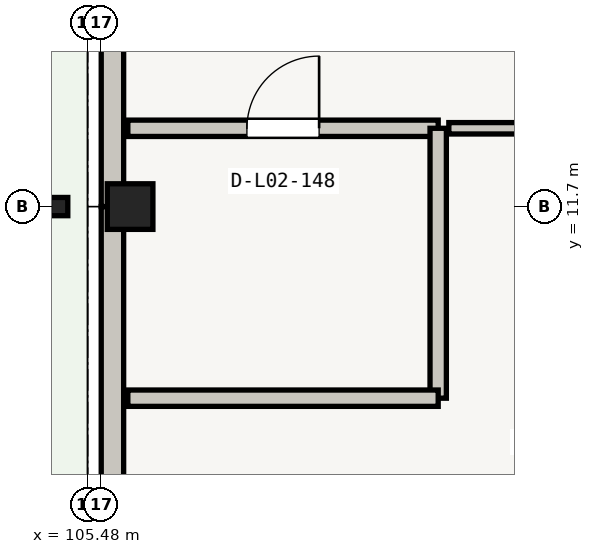
"""IFC4 building model, lengths in metres.
Left out: names, types, materials, properties, quantities, classifications, styles, units other than length and angle.
Written with IfcOpenShell. Run it as: python <this file> out.ifc"""

import sys

from ifc_helpers import new_model, si_unit, direction, frame, frame_2d, origin, origin_2d, place, context, subcontext, project, spatial, rectangle, i_section, extrude, element, fill, save


model = new_model("IFC4")
c1 = context("Model", 3, precision=1e-05, world=origin(), true_north=direction((0.0, 1.0)))
c2 = subcontext(c1, "Body", "Model", "MODEL_VIEW")
j1 = project(units=[si_unit("LENGTHUNIT", "METRE"), si_unit("PLANEANGLEUNIT", "RADIAN")], contexts=[c1])
p1 = place(None, origin())
s1 = spatial("IfcSite", under=j1, at=p1, CompositionType="ELEMENT")
p2 = place(p1, origin())
s2 = spatial("IfcBuilding", under=s1, at=p2, CompositionType="ELEMENT")
p3 = place(p2, frame((0.0, 0.0, 8.7)))
s3 = spatial("IfcBuildingStorey", under=s2, at=p3, CompositionType="ELEMENT", Elevation=8.7)
p4 = place(p3, frame((106.04, 11.7, 0.0), z_axis=(0.0, 0.0, 1.0), x_axis=(1.0, 0.0, 0.0)))
e1 = element("IfcColumn", 1, at=p4, inside=s3, PredefinedType="COLUMN", context=c2, shape_type="SweptSolid", body=[
    extrude(rectangle(XDim=0.6, YDim=0.6, at=origin_2d()), origin(), (0.0, 0.0, 1.0), 4.02),
])
p5 = place(p3, frame((105.1, 11.7, -0.24), z_axis=(0.0, 0.0, 1.0), x_axis=(1.0, 0.0, 0.0)))
e2 = element("IfcColumn", 2, at=p5, inside=s3, PredefinedType="COLUMN", context=c2, shape_type="SweptSolid", body=[
    extrude(i_section(OverallWidth=0.24, OverallDepth=0.24, WebThickness=0.01, FlangeThickness=0.017, FilletRadius=0.021, at=origin_2d()), origin(), (0.0, 0.0, 1.0), 1.12),
])
for number, where, z_axis, x_axis in (
    (3, (105.808, 4.795, 0.0), (0.0, 0.0, 1.0), (0.0, 1.0, 0.0)),
    (4, (105.808, 11.7, 0.0), (0.0, 0.0, 1.0), (0.0, 1.0, 0.0)),
):
    element("IfcWall", number, at=place(p3, frame(where, z_axis=z_axis, x_axis=x_axis)), inside=s3, PredefinedType="STANDARD", context=c2, shape_type="SweptSolid", body=[
        extrude(rectangle(XDim=6.905, YDim=0.295, at=frame_2d((3.453, 0.0))), origin(), (0.0, 0.0, 1.0), 3.632),
    ])
p6 = place(p3, frame((106.01, 12.73, 0.0), z_axis=(0.0, 0.0, 1.0), x_axis=(1.0, 0.0, 0.0)))
e5 = element("IfcWall", 5, at=p6, inside=s3, PredefinedType="PLUMBINGWALL", context=c2, shape_type="SweptSolid", body=[
    extrude(rectangle(XDim=4.083, YDim=0.215, at=frame_2d((2.042, 0.0))), origin(), (0.0, 0.0, 1.0), 2.925),
])
p7 = place(p6, frame((1.567, 0.0, 0.0)))
e6 = element("IfcOpeningElement", 6, at=p7, cuts=e5, PredefinedType="OPENING", context=c2, shape_type="SweptSolid", body=[
    extrude(rectangle(XDim=0.95, YDim=2.05, at=frame_2d((0.475, 1.025))), frame((0.0, 0.107, 0.0), z_axis=(0.0, -1.0, 0.0), x_axis=(1.0, 0.0, 0.0)), (0.0, 0.0, 1.0), 0.215),
])
p8 = place(p3, frame((110.094, 12.73, 0.0), z_axis=(0.0, 0.0, 1.0), x_axis=(0.0, -1.0, 0.0)))
e7 = element("IfcWall", 7, at=p8, inside=s3, PredefinedType="PLUMBINGWALL", context=c2, shape_type="SweptSolid", body=[
    extrude(rectangle(XDim=3.551, YDim=0.215, at=frame_2d((1.775, 0.0))), origin(), (0.0, 0.0, 1.0), 2.925),
])
p9 = place(p3, frame((110.094, 9.179, 0.0), z_axis=(0.0, 0.0, 1.0), x_axis=(-1.0, 0.0, 0.0)))
e8 = element("IfcWall", 8, at=p9, inside=s3, PredefinedType="PLUMBINGWALL", context=c2, shape_type="SweptSolid", body=[
    extrude(rectangle(XDim=4.083, YDim=0.215, at=frame_2d((2.042, 0.0))), origin(), (0.0, 0.0, 1.0), 2.925),
])
p10 = place(p3, frame((110.233, 12.73, 0.0), z_axis=(0.0, 0.0, 1.0), x_axis=(1.0, 0.0, 0.0)))
e9 = element("IfcWall", 9, at=p10, inside=s3, PredefinedType="PARTITIONING", context=c2, shape_type="SweptSolid", body=[
    extrude(rectangle(XDim=7.527, YDim=0.15, at=frame_2d((3.763, 0.0))), origin(), (0.0, 0.0, 1.0), 2.925),
])
p11 = place(p10, frame((4.216, 0.0, 0.0)))
e10 = element("IfcOpeningElement", 10, at=p11, cuts=e9, PredefinedType="OPENING", context=c2, shape_type="SweptSolid", body=[
    extrude(rectangle(XDim=1.04, YDim=2.05, at=frame_2d((0.52, 1.025))), frame((0.0, 0.075, 0.0), z_axis=(0.0, -1.0, 0.0), x_axis=(1.0, 0.0, 0.0)), (0.0, 0.0, 1.0), 0.15),
])
p12 = place(p7, origin())
e11 = element("IfcDoor", 11, at=p12, inside=s3, OperationType="SINGLE_SWING_RIGHT", PredefinedType="DOOR", context=c2, shape_type="SweptSolid", body=[
    extrude(rectangle(XDim=0.95, YDim=2.05, at=frame_2d((0.475, 1.025))), frame((0.0, 0.025, 0.0), z_axis=(0.0, -1.0, 0.0), x_axis=(1.0, 0.0, 0.0)), (0.0, 0.0, 1.0), 0.05),
])
fill(e6, e11)
save(model, sys.argv[1])
